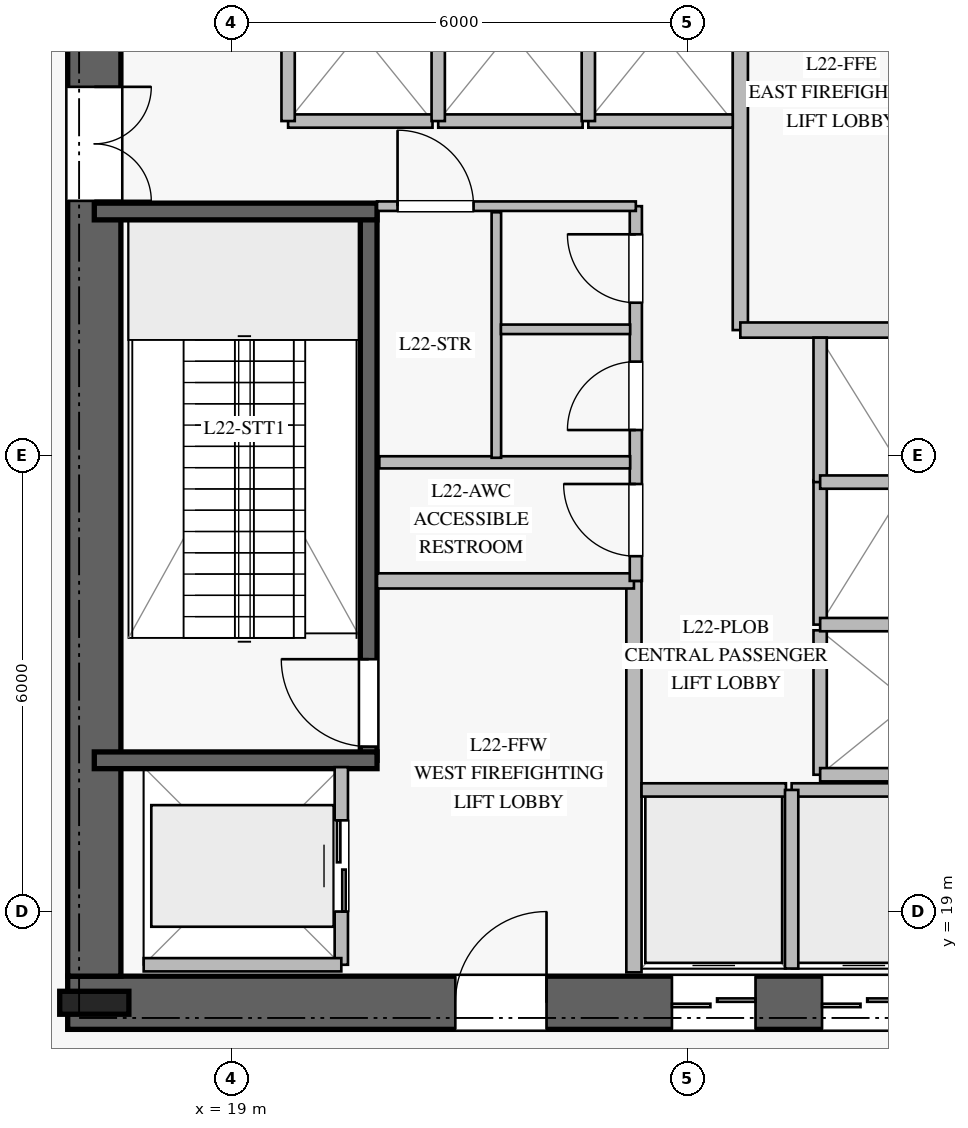
"""IFC4 building model, lengths in metres.
Left out: names, types, materials, properties, quantities, classifications, styles, units other than length and angle.
Written with IfcOpenShell. Run it as: python <this file> out.ifc"""

import sys

from ifc_helpers import new_model, si_unit, direction, frame, frame_2d, origin, origin_2d, place, context, subcontext, project, spatial, rectangle, i_section, extrude, element, fill, save


model = new_model("IFC4")
c1 = context("Model", 3, precision=1e-05, world=origin(), true_north=direction((0.0, 1.0)))
c2 = subcontext(c1, "Body", "Model", "MODEL_VIEW")
j1 = project(units=[si_unit("LENGTHUNIT", "METRE"), si_unit("PLANEANGLEUNIT", "RADIAN")], contexts=[c1])
p1 = place(None, origin())
s1 = spatial("IfcSite", under=j1, at=p1, CompositionType="ELEMENT")
p2 = place(p1, origin())
s2 = spatial("IfcBuilding", under=s1, at=p2, CompositionType="ELEMENT")
p3 = place(p2, frame((0.0, 0.0, 92.0)))
s3 = spatial("IfcBuildingStorey", under=s2, at=p3, CompositionType="ELEMENT", Elevation=92.0)
p4 = place(p3, frame((16.85, 17.8, 0.0), z_axis=(0.0, 0.0, 1.0), x_axis=(1.0, 0.0, 0.0)))
e1 = element("IfcWall", 1, at=p4, inside=s3, PredefinedType="SHEAR", context=c2, shape_type="SweptSolid", body=[
    extrude(rectangle(XDim=16.3, YDim=0.7, at=frame_2d((8.15, 0.0))), origin(), (0.0, 0.0, 1.0), 5.14),
])
p5 = place(p4, frame((5.1, 0.0, 0.0)))
e2 = element("IfcOpeningElement", 2, at=p5, cuts=e1, PredefinedType="OPENING", context=c2, shape_type="SweptSolid", body=[
    extrude(rectangle(XDim=1.2, YDim=2.25, at=frame_2d((0.6, 1.125))), frame((0.0, 0.36, 0.0), z_axis=(0.0, -1.0, 0.0), x_axis=(1.0, 0.0, 0.0)), (0.0, 0.0, 1.0), 0.72),
])
p6 = place(p4, frame((14.05, 0.0, 0.0)))
e3 = element("IfcOpeningElement", 3, at=p6, cuts=e1, PredefinedType="OPENING", context=c2, shape_type="SweptSolid", body=[
    extrude(rectangle(XDim=0.9, YDim=2.1, at=frame_2d((0.45, 1.05))), frame((0.0, 0.36, 0.0), z_axis=(0.0, -1.0, 0.0), x_axis=(1.0, 0.0, 0.0)), (0.0, 0.0, 1.0), 0.72),
])
p7 = place(p4, frame((7.95, 0.0, 0.0)))
e4 = element("IfcOpeningElement", 4, at=p7, cuts=e1, PredefinedType="OPENING", context=c2, shape_type="SweptSolid", body=[
    extrude(rectangle(XDim=1.1, YDim=2.2, at=frame_2d((0.55, 1.1))), frame((0.0, 0.36, 0.0), z_axis=(0.0, -1.0, 0.0), x_axis=(1.0, 0.0, 0.0)), (0.0, 0.0, 1.0), 0.72),
])
p8 = place(p4, frame((9.925, 0.0, 0.0)))
e5 = element("IfcOpeningElement", 5, at=p8, cuts=e1, PredefinedType="OPENING", context=c2, shape_type="SweptSolid", body=[
    extrude(rectangle(XDim=1.1, YDim=2.2, at=frame_2d((0.55, 1.1))), frame((0.0, 0.36, 0.0), z_axis=(0.0, -1.0, 0.0), x_axis=(1.0, 0.0, 0.0)), (0.0, 0.0, 1.0), 0.72),
])
p9 = place(p4, frame((11.9, 0.0, 0.0)))
e6 = element("IfcOpeningElement", 6, at=p9, cuts=e1, PredefinedType="OPENING", context=c2, shape_type="SweptSolid", body=[
    extrude(rectangle(XDim=1.1, YDim=2.2, at=frame_2d((0.55, 1.1))), frame((0.0, 0.36, 0.0), z_axis=(0.0, -1.0, 0.0), x_axis=(1.0, 0.0, 0.0)), (0.0, 0.0, 1.0), 0.72),
])
p10 = place(p3, frame((17.2, 31.85, 0.0), z_axis=(0.0, 0.0, 1.0), x_axis=(0.0, -1.0, 0.0)))
e7 = element("IfcWall", 7, at=p10, inside=s3, PredefinedType="SHEAR", context=c2, shape_type="SweptSolid", body=[
    extrude(rectangle(XDim=13.7, YDim=0.7, at=frame_2d((6.85, 0.0))), origin(), (0.0, 0.0, 1.0), 5.14),
])
p11 = place(p10, frame((2.0, 0.0, 0.0)))
e8 = element("IfcOpeningElement", 8, at=p11, cuts=e7, PredefinedType="OPENING", context=c2, shape_type="SweptSolid", body=[
    extrude(rectangle(XDim=1.5, YDim=2.2, at=frame_2d((0.75, 1.1))), frame((0.0, 0.36, 0.0), z_axis=(0.0, -1.0, 0.0), x_axis=(1.0, 0.0, 0.0)), (0.0, 0.0, 1.0), 0.72),
])
p12 = place(p3, frame((17.2, 17.8, 0.0), z_axis=(0.0, 0.0, 1.0), x_axis=(1.0, 0.0, 0.0)))
e9 = element("IfcColumn", 9, at=p12, inside=s3, PredefinedType="COLUMN", context=c2, shape_type="SweptSolid", body=[
    extrude(i_section(OverallWidth=0.302, OverallDepth=0.91, WebThickness=0.021, FlangeThickness=0.04, at=origin_2d()), origin(), (0.0, 0.0, 1.0), 5.4),
])
p13 = place(p3, frame((20.81, 20.99, 0.0), z_axis=(0.0, 0.0, 1.0), x_axis=(0.0, 1.0, 0.0)))
e10 = element("IfcWall", 10, at=p13, inside=s3, PredefinedType="SOLIDWALL", context=c2, shape_type="SweptSolid", body=[
    extrude(rectangle(XDim=7.22, YDim=0.22, at=frame_2d((3.61, 0.0))), origin(), (0.0, 0.0, 1.0), 5.14),
])
p14 = place(p13, frame((0.18, 0.0, 0.0)))
e11 = element("IfcOpeningElement", 11, at=p14, cuts=e10, PredefinedType="OPENING", context=c2, shape_type="SweptSolid", body=[
    extrude(rectangle(XDim=1.15, YDim=2.2, at=frame_2d((0.575, 1.1))), frame((0.0, 0.12, 0.0), z_axis=(0.0, -1.0, 0.0), x_axis=(1.0, 0.0, 0.0)), (0.0, 0.0, 1.0), 0.24),
])
for number, where, z_axis, x_axis in (
    (12, (17.2, 20.99, 0.0), (0.0, 0.0, 1.0), (1.0, 0.0, 0.0)),
    (13, (17.2, 28.21, 0.0), (0.0, 0.0, 1.0), (1.0, 0.0, 0.0)),
):
    element("IfcWall", number, at=place(p3, frame(where, z_axis=z_axis, x_axis=x_axis)), inside=s3, PredefinedType="SOLIDWALL", context=c2, shape_type="SweptSolid", body=[
        extrude(rectangle(XDim=3.72, YDim=0.22, at=frame_2d((1.86, 0.0))), origin(), (0.0, 0.0, 1.0), 5.14),
    ])
p15 = place(p3, frame((24.3, 18.2, 0.0), z_axis=(0.0, 0.0, 1.0), x_axis=(0.0, 1.0, 0.0)))
e14 = element("IfcWall", 14, at=p15, inside=s3, PredefinedType="PARTITIONING", context=c2, shape_type="SweptSolid", body=[
    extrude(rectangle(XDim=5.15, YDim=0.2, at=frame_2d((2.575, 0.0))), origin(), (0.0, 0.0, 1.0), 5.14),
])
p16 = place(p3, frame((20.92, 23.35, 0.0), z_axis=(0.0, 0.0, 1.0), x_axis=(1.0, 0.0, 0.0)))
e15 = element("IfcWall", 15, at=p16, inside=s3, PredefinedType="PARTITIONING", context=c2, shape_type="SweptSolid", body=[
    extrude(rectangle(XDim=3.38, YDim=0.2, at=frame_2d((1.69, 0.0))), origin(), (0.0, 0.0, 1.0), 5.14),
])
p17 = place(p3, frame((25.7, 26.65, 0.0), z_axis=(0.0, 0.0, 1.0), x_axis=(0.0, 1.0, 0.0)))
e16 = element("IfcWall", 16, at=p17, inside=s3, PredefinedType="PARTITIONING", context=c2, shape_type="SweptSolid", body=[
    extrude(rectangle(XDim=5.15, YDim=0.2, at=frame_2d((2.575, 0.0))), origin(), (0.0, 0.0, 1.0), 5.14),
])
p18 = place(p3, frame((25.7, 26.65, 0.0), z_axis=(0.0, 0.0, 1.0), x_axis=(1.0, 0.0, 0.0)))
e17 = element("IfcWall", 17, at=p18, inside=s3, PredefinedType="PARTITIONING", context=c2, shape_type="SweptSolid", body=[
    extrude(rectangle(XDim=3.38, YDim=0.2, at=frame_2d((1.69, 0.0))), origin(), (0.0, 0.0, 1.0), 5.14),
])
p19 = place(p3, frame((24.325, 23.35, 0.0), z_axis=(0.0, 0.0, 1.0), x_axis=(0.0, 1.0, 0.0)))
e18 = element("IfcWall", 18, at=p19, inside=s3, PredefinedType="PLUMBINGWALL", context=c2, shape_type="SweptSolid", body=[
    extrude(rectangle(XDim=4.93, YDim=0.16, at=frame_2d((2.465, 0.0))), origin(), (0.0, 0.0, 1.0), 5.14),
])
p20 = place(p19, frame((0.325, 0.0, 0.0)))
e19 = element("IfcOpeningElement", 19, at=p20, cuts=e18, PredefinedType="OPENING", context=c2, shape_type="SweptSolid", body=[
    extrude(rectangle(XDim=0.95, YDim=2.1, at=frame_2d((0.475, 1.05))), frame((0.0, 0.09, 0.0), z_axis=(0.0, -1.0, 0.0), x_axis=(1.0, 0.0, 0.0)), (0.0, 0.0, 1.0), 0.18),
])
p21 = place(p19, frame((1.985, 0.0, 0.0)))
e20 = element("IfcOpeningElement", 20, at=p21, cuts=e18, PredefinedType="OPENING", context=c2, shape_type="SweptSolid", body=[
    extrude(rectangle(XDim=0.9, YDim=2.1, at=frame_2d((0.45, 1.05))), frame((0.0, 0.09, 0.0), z_axis=(0.0, -1.0, 0.0), x_axis=(1.0, 0.0, 0.0)), (0.0, 0.0, 1.0), 0.18),
])
p22 = place(p19, frame((3.66, 0.0, 0.0)))
e21 = element("IfcOpeningElement", 21, at=p22, cuts=e18, PredefinedType="OPENING", context=c2, shape_type="SweptSolid", body=[
    extrude(rectangle(XDim=0.9, YDim=2.1, at=frame_2d((0.45, 1.05))), frame((0.0, 0.09, 0.0), z_axis=(0.0, -1.0, 0.0), x_axis=(1.0, 0.0, 0.0)), (0.0, 0.0, 1.0), 0.18),
])
p23 = place(p3, frame((20.92, 28.28, 0.0), z_axis=(0.0, 0.0, 1.0), x_axis=(1.0, 0.0, 0.0)))
e22 = element("IfcWall", 22, at=p23, inside=s3, PredefinedType="PARTITIONING", context=c2, shape_type="SweptSolid", body=[
    extrude(rectangle(XDim=3.405, YDim=0.125, at=frame_2d((1.703, 0.0))), origin(), (0.0, 0.0, 1.0), 5.14),
])
p24 = place(p23, frame((0.27, 0.0, 0.0)))
e23 = element("IfcOpeningElement", 23, at=p24, cuts=e22, PredefinedType="OPENING", context=c2, shape_type="SweptSolid", body=[
    extrude(rectangle(XDim=1.0, YDim=2.15, at=frame_2d((0.5, 1.075))), frame((0.0, 0.073, 0.0), z_axis=(0.0, -1.0, 0.0), x_axis=(1.0, 0.0, 0.0)), (0.0, 0.0, 1.0), 0.145),
])
p25 = place(p3, frame((20.95, 24.91, 0.0), z_axis=(0.0, 0.0, 1.0), x_axis=(1.0, 0.0, 0.0)))
e24 = element("IfcWall", 24, at=p25, inside=s3, PredefinedType="PLUMBINGWALL", context=c2, shape_type="SweptSolid", body=[
    extrude(rectangle(XDim=3.3, YDim=0.16, at=frame_2d((1.65, 0.0))), origin(), (0.0, 0.0, 1.0), 5.14),
])
p26 = place(p3, frame((22.49, 24.97, 0.0), z_axis=(0.0, 0.0, 1.0), x_axis=(0.0, 1.0, 0.0)))
e25 = element("IfcWall", 25, at=p26, inside=s3, PredefinedType="PARTITIONING", context=c2, shape_type="SweptSolid", body=[
    extrude(rectangle(XDim=3.23, YDim=0.125, at=frame_2d((1.615, 0.0))), origin(), (0.0, 0.0, 1.0), 5.14),
])
p27 = place(p3, frame((22.55, 26.66, 0.0), z_axis=(0.0, 0.0, 1.0), x_axis=(1.0, 0.0, 0.0)))
e26 = element("IfcWall", 26, at=p27, inside=s3, PredefinedType="PARTITIONING", context=c2, shape_type="SweptSolid", body=[
    extrude(rectangle(XDim=1.7, YDim=0.125, at=frame_2d((0.85, 0.0))), origin(), (0.0, 0.0, 1.0), 5.14),
])
p28 = place(p3, frame((24.4, 20.6, 0.0), z_axis=(0.0, 0.0, 1.0), x_axis=(1.0, 0.0, 0.0)))
e27 = element("IfcWall", 27, at=p28, inside=s3, PredefinedType="PARTITIONING", context=c2, shape_type="SweptSolid", body=[
    extrude(rectangle(XDim=1.9, YDim=0.175, at=frame_2d((0.95, 0.0))), origin(), (0.0, 0.0, 1.0), 5.14),
])
p29 = place(p3, frame((26.375, 20.6, 0.0), z_axis=(0.0, 0.0, 1.0), x_axis=(1.0, 0.0, 0.0)))
e28 = element("IfcWall", 28, at=p29, inside=s3, PredefinedType="PARTITIONING", context=c2, shape_type="SweptSolid", body=[
    extrude(rectangle(XDim=1.9, YDim=0.175, at=frame_2d((0.95, 0.0))), origin(), (0.0, 0.0, 1.0), 5.14),
])
p30 = place(p3, frame((26.375, 18.25, 0.0), z_axis=(0.0, 0.0, 1.0), x_axis=(0.0, 1.0, 0.0)))
e29 = element("IfcWall", 29, at=p30, inside=s3, PredefinedType="PARTITIONING", context=c2, shape_type="SweptSolid", body=[
    extrude(rectangle(XDim=2.35, YDim=0.175, at=frame_2d((1.175, 0.0))), origin(), (0.0, 0.0, 1.0), 5.14),
])
p31 = place(p3, frame((19.75, 29.4, 0.0), z_axis=(0.0, 0.0, 1.0), x_axis=(1.0, 0.0, 0.0)))
e30 = element("IfcWall", 30, at=p31, inside=s3, PredefinedType="PARTITIONING", context=c2, shape_type="SweptSolid", body=[
    extrude(rectangle(XDim=1.9, YDim=0.175, at=frame_2d((0.95, 0.0))), origin(), (0.0, 0.0, 1.0), 5.14),
])
p32 = place(p3, frame((19.75, 29.4, 0.0), z_axis=(0.0, 0.0, 1.0), x_axis=(0.0, 1.0, 0.0)))
e31 = element("IfcWall", 31, at=p32, inside=s3, PredefinedType="PARTITIONING", context=c2, shape_type="SweptSolid", body=[
    extrude(rectangle(XDim=2.35, YDim=0.175, at=frame_2d((1.175, 0.0))), origin(), (0.0, 0.0, 1.0), 5.14),
])
p33 = place(p3, frame((21.725, 29.4, 0.0), z_axis=(0.0, 0.0, 1.0), x_axis=(1.0, 0.0, 0.0)))
e32 = element("IfcWall", 32, at=p33, inside=s3, PredefinedType="PARTITIONING", context=c2, shape_type="SweptSolid", body=[
    extrude(rectangle(XDim=1.9, YDim=0.175, at=frame_2d((0.95, 0.0))), origin(), (0.0, 0.0, 1.0), 5.14),
])
p34 = place(p3, frame((21.725, 29.4, 0.0), z_axis=(0.0, 0.0, 1.0), x_axis=(0.0, 1.0, 0.0)))
e33 = element("IfcWall", 33, at=p34, inside=s3, PredefinedType="PARTITIONING", context=c2, shape_type="SweptSolid", body=[
    extrude(rectangle(XDim=2.35, YDim=0.175, at=frame_2d((1.175, 0.0))), origin(), (0.0, 0.0, 1.0), 5.14),
])
p35 = place(p3, frame((23.7, 29.4, 0.0), z_axis=(0.0, 0.0, 1.0), x_axis=(1.0, 0.0, 0.0)))
e34 = element("IfcWall", 34, at=p35, inside=s3, PredefinedType="PARTITIONING", context=c2, shape_type="SweptSolid", body=[
    extrude(rectangle(XDim=1.9, YDim=0.175, at=frame_2d((0.95, 0.0))), origin(), (0.0, 0.0, 1.0), 5.14),
])
p36 = place(p3, frame((23.7, 29.4, 0.0), z_axis=(0.0, 0.0, 1.0), x_axis=(0.0, 1.0, 0.0)))
e35 = element("IfcWall", 35, at=p36, inside=s3, PredefinedType="PARTITIONING", context=c2, shape_type="SweptSolid", body=[
    extrude(rectangle(XDim=2.35, YDim=0.175, at=frame_2d((1.175, 0.0))), origin(), (0.0, 0.0, 1.0), 5.14),
])
p37 = place(p3, frame((26.75, 20.8, 0.0), z_axis=(0.0, 0.0, 1.0), x_axis=(0.0, 1.0, 0.0)))
e36 = element("IfcWall", 36, at=p37, inside=s3, PredefinedType="PARTITIONING", context=c2, shape_type="SweptSolid", body=[
    extrude(rectangle(XDim=1.9, YDim=0.175, at=frame_2d((0.95, 0.0))), origin(), (0.0, 0.0, 1.0), 5.14),
])
p38 = place(p3, frame((26.75, 20.8, 0.0), z_axis=(0.0, 0.0, 1.0), x_axis=(1.0, 0.0, 0.0)))
e37 = element("IfcWall", 37, at=p38, inside=s3, PredefinedType="PARTITIONING", context=c2, shape_type="SweptSolid", body=[
    extrude(rectangle(XDim=2.35, YDim=0.175, at=frame_2d((1.175, 0.0))), origin(), (0.0, 0.0, 1.0), 5.14),
])
p39 = place(p3, frame((26.75, 22.775, 0.0), z_axis=(0.0, 0.0, 1.0), x_axis=(0.0, 1.0, 0.0)))
e38 = element("IfcWall", 38, at=p39, inside=s3, PredefinedType="PARTITIONING", context=c2, shape_type="SweptSolid", body=[
    extrude(rectangle(XDim=1.9, YDim=0.175, at=frame_2d((0.95, 0.0))), origin(), (0.0, 0.0, 1.0), 5.14),
])
p40 = place(p3, frame((26.75, 22.775, 0.0), z_axis=(0.0, 0.0, 1.0), x_axis=(1.0, 0.0, 0.0)))
e39 = element("IfcWall", 39, at=p40, inside=s3, PredefinedType="PARTITIONING", context=c2, shape_type="SweptSolid", body=[
    extrude(rectangle(XDim=2.35, YDim=0.175, at=frame_2d((1.175, 0.0))), origin(), (0.0, 0.0, 1.0), 5.14),
])
p41 = place(p3, frame((26.75, 24.65, 0.0), z_axis=(0.0, 0.0, 1.0), x_axis=(0.0, 1.0, 0.0)))
e40 = element("IfcWall", 40, at=p41, inside=s3, PredefinedType="PARTITIONING", context=c2, shape_type="SweptSolid", body=[
    extrude(rectangle(XDim=1.9, YDim=0.175, at=frame_2d((0.95, 0.0))), origin(), (0.0, 0.0, 1.0), 5.14),
])
p42 = place(p3, frame((26.75, 24.65, 0.0), z_axis=(0.0, 0.0, 1.0), x_axis=(1.0, 0.0, 0.0)))
e41 = element("IfcWall", 41, at=p42, inside=s3, PredefinedType="PARTITIONING", context=c2, shape_type="SweptSolid", body=[
    extrude(rectangle(XDim=2.35, YDim=0.175, at=frame_2d((1.175, 0.0))), origin(), (0.0, 0.0, 1.0), 5.14),
])
p43 = place(p3, frame((20.45, 18.3, 0.0), z_axis=(0.0, 0.0, 1.0), x_axis=(0.0, 1.0, 0.0)))
e42 = element("IfcWall", 42, at=p43, inside=s3, PredefinedType="PARTITIONING", context=c2, shape_type="SweptSolid", body=[
    extrude(rectangle(XDim=2.6, YDim=0.175, at=frame_2d((1.3, 0.0))), origin(), (0.0, 0.0, 1.0), 5.14),
])
p44 = place(p43, frame((0.7, 0.0, 0.0)))
e43 = element("IfcOpeningElement", 43, at=p44, cuts=e42, PredefinedType="OPENING", context=c2, shape_type="SweptSolid", body=[
    extrude(rectangle(XDim=1.2, YDim=2.2, at=frame_2d((0.6, 1.1))), frame((0.0, 0.098, 0.0), z_axis=(0.0, -1.0, 0.0), x_axis=(1.0, 0.0, 0.0)), (0.0, 0.0, 1.0), 0.195),
])
p45 = place(p3, frame((17.85, 18.3, 0.0), z_axis=(0.0, 0.0, 1.0), x_axis=(1.0, 0.0, 0.0)))
e44 = element("IfcWall", 44, at=p45, inside=s3, PredefinedType="PARTITIONING", context=c2, shape_type="SweptSolid", body=[
    extrude(rectangle(XDim=2.6, YDim=0.175, at=frame_2d((1.3, 0.0))), origin(), (0.0, 0.0, 1.0), 5.14),
])
p46 = place(p14, origin())
e45 = element("IfcDoor", 45, at=p46, inside=s3, OperationType="SINGLE_SWING_RIGHT", PredefinedType="DOOR", context=c2, shape_type="SweptSolid", body=[
    extrude(rectangle(XDim=1.15, YDim=2.2, at=frame_2d((0.575, 1.1))), frame((0.0, 0.025, 0.0), z_axis=(0.0, -1.0, 0.0), x_axis=(1.0, 0.0, 0.0)), (0.0, 0.0, 1.0), 0.05),
])
fill(e11, e45)
p47 = place(p5, origin())
e46 = element("IfcDoor", 46, at=p47, inside=s3, OperationType="SINGLE_SWING_RIGHT", PredefinedType="DOOR", context=c2, shape_type="SweptSolid", body=[
    extrude(rectangle(XDim=1.2, YDim=2.25, at=frame_2d((0.6, 1.125))), frame((0.0, 0.025, 0.0), z_axis=(0.0, -1.0, 0.0), x_axis=(1.0, 0.0, 0.0)), (0.0, 0.0, 1.0), 0.05),
])
fill(e2, e46)
p48 = place(p11, origin())
e47 = element("IfcDoor", 47, at=p48, inside=s3, OperationType="DOUBLE_DOOR_SINGLE_SWING", PredefinedType="DOOR", context=c2, shape_type="SweptSolid", body=[
    extrude(rectangle(XDim=1.5, YDim=2.2, at=frame_2d((0.75, 1.1))), frame((0.0, 0.025, 0.0), z_axis=(0.0, -1.0, 0.0), x_axis=(1.0, 0.0, 0.0)), (0.0, 0.0, 1.0), 0.05),
])
fill(e8, e47)
p49 = place(p20, origin())
e48 = element("IfcDoor", 48, at=p49, inside=s3, OperationType="SINGLE_SWING_RIGHT", PredefinedType="DOOR", context=c2, shape_type="SweptSolid", body=[
    extrude(rectangle(XDim=0.95, YDim=2.1, at=frame_2d((0.475, 1.05))), frame((0.0, 0.025, 0.0), z_axis=(0.0, -1.0, 0.0), x_axis=(1.0, 0.0, 0.0)), (0.0, 0.0, 1.0), 0.05),
])
fill(e19, e48)
p50 = place(p21, origin())
e49 = element("IfcDoor", 49, at=p50, inside=s3, OperationType="SINGLE_SWING_LEFT", PredefinedType="DOOR", context=c2, shape_type="SweptSolid", body=[
    extrude(rectangle(XDim=0.9, YDim=2.1, at=frame_2d((0.45, 1.05))), frame((0.0, 0.025, 0.0), z_axis=(0.0, -1.0, 0.0), x_axis=(1.0, 0.0, 0.0)), (0.0, 0.0, 1.0), 0.05),
])
fill(e20, e49)
p51 = place(p22, origin())
e50 = element("IfcDoor", 50, at=p51, inside=s3, OperationType="SINGLE_SWING_RIGHT", PredefinedType="DOOR", context=c2, shape_type="SweptSolid", body=[
    extrude(rectangle(XDim=0.9, YDim=2.1, at=frame_2d((0.45, 1.05))), frame((0.0, 0.025, 0.0), z_axis=(0.0, -1.0, 0.0), x_axis=(1.0, 0.0, 0.0)), (0.0, 0.0, 1.0), 0.05),
])
fill(e21, e50)
p52 = place(p24, origin())
e51 = element("IfcDoor", 51, at=p52, inside=s3, OperationType="SINGLE_SWING_LEFT", PredefinedType="DOOR", context=c2, shape_type="SweptSolid", body=[
    extrude(rectangle(XDim=1.0, YDim=2.15, at=frame_2d((0.5, 1.075))), frame((0.0, 0.025, 0.0), z_axis=(0.0, -1.0, 0.0), x_axis=(1.0, 0.0, 0.0)), (0.0, 0.0, 1.0), 0.05),
])
fill(e23, e51)
p53 = place(p7, origin())
e52 = element("IfcDoor", 52, at=p53, inside=s3, OperationType="DOUBLE_DOOR_SLIDING", PredefinedType="DOOR", context=c2, shape_type="SweptSolid", body=[
    extrude(rectangle(XDim=1.1, YDim=2.2, at=frame_2d((0.55, 1.1))), frame((0.0, 0.025, 0.0), z_axis=(0.0, -1.0, 0.0), x_axis=(1.0, 0.0, 0.0)), (0.0, 0.0, 1.0), 0.05),
])
fill(e4, e52)
p54 = place(p8, origin())
e53 = element("IfcDoor", 53, at=p54, inside=s3, OperationType="DOUBLE_DOOR_SLIDING", PredefinedType="DOOR", context=c2, shape_type="SweptSolid", body=[
    extrude(rectangle(XDim=1.1, YDim=2.2, at=frame_2d((0.55, 1.1))), frame((0.0, 0.025, 0.0), z_axis=(0.0, -1.0, 0.0), x_axis=(1.0, 0.0, 0.0)), (0.0, 0.0, 1.0), 0.05),
])
fill(e5, e53)
p55 = place(p44, origin())
e54 = element("IfcDoor", 54, at=p55, inside=s3, OperationType="DOUBLE_DOOR_SLIDING", PredefinedType="DOOR", context=c2, shape_type="SweptSolid", body=[
    extrude(rectangle(XDim=1.2, YDim=2.2, at=frame_2d((0.6, 1.1))), frame((0.0, 0.025, 0.0), z_axis=(0.0, -1.0, 0.0), x_axis=(1.0, 0.0, 0.0)), (0.0, 0.0, 1.0), 0.05),
])
fill(e43, e54)
save(model, sys.argv[1])
